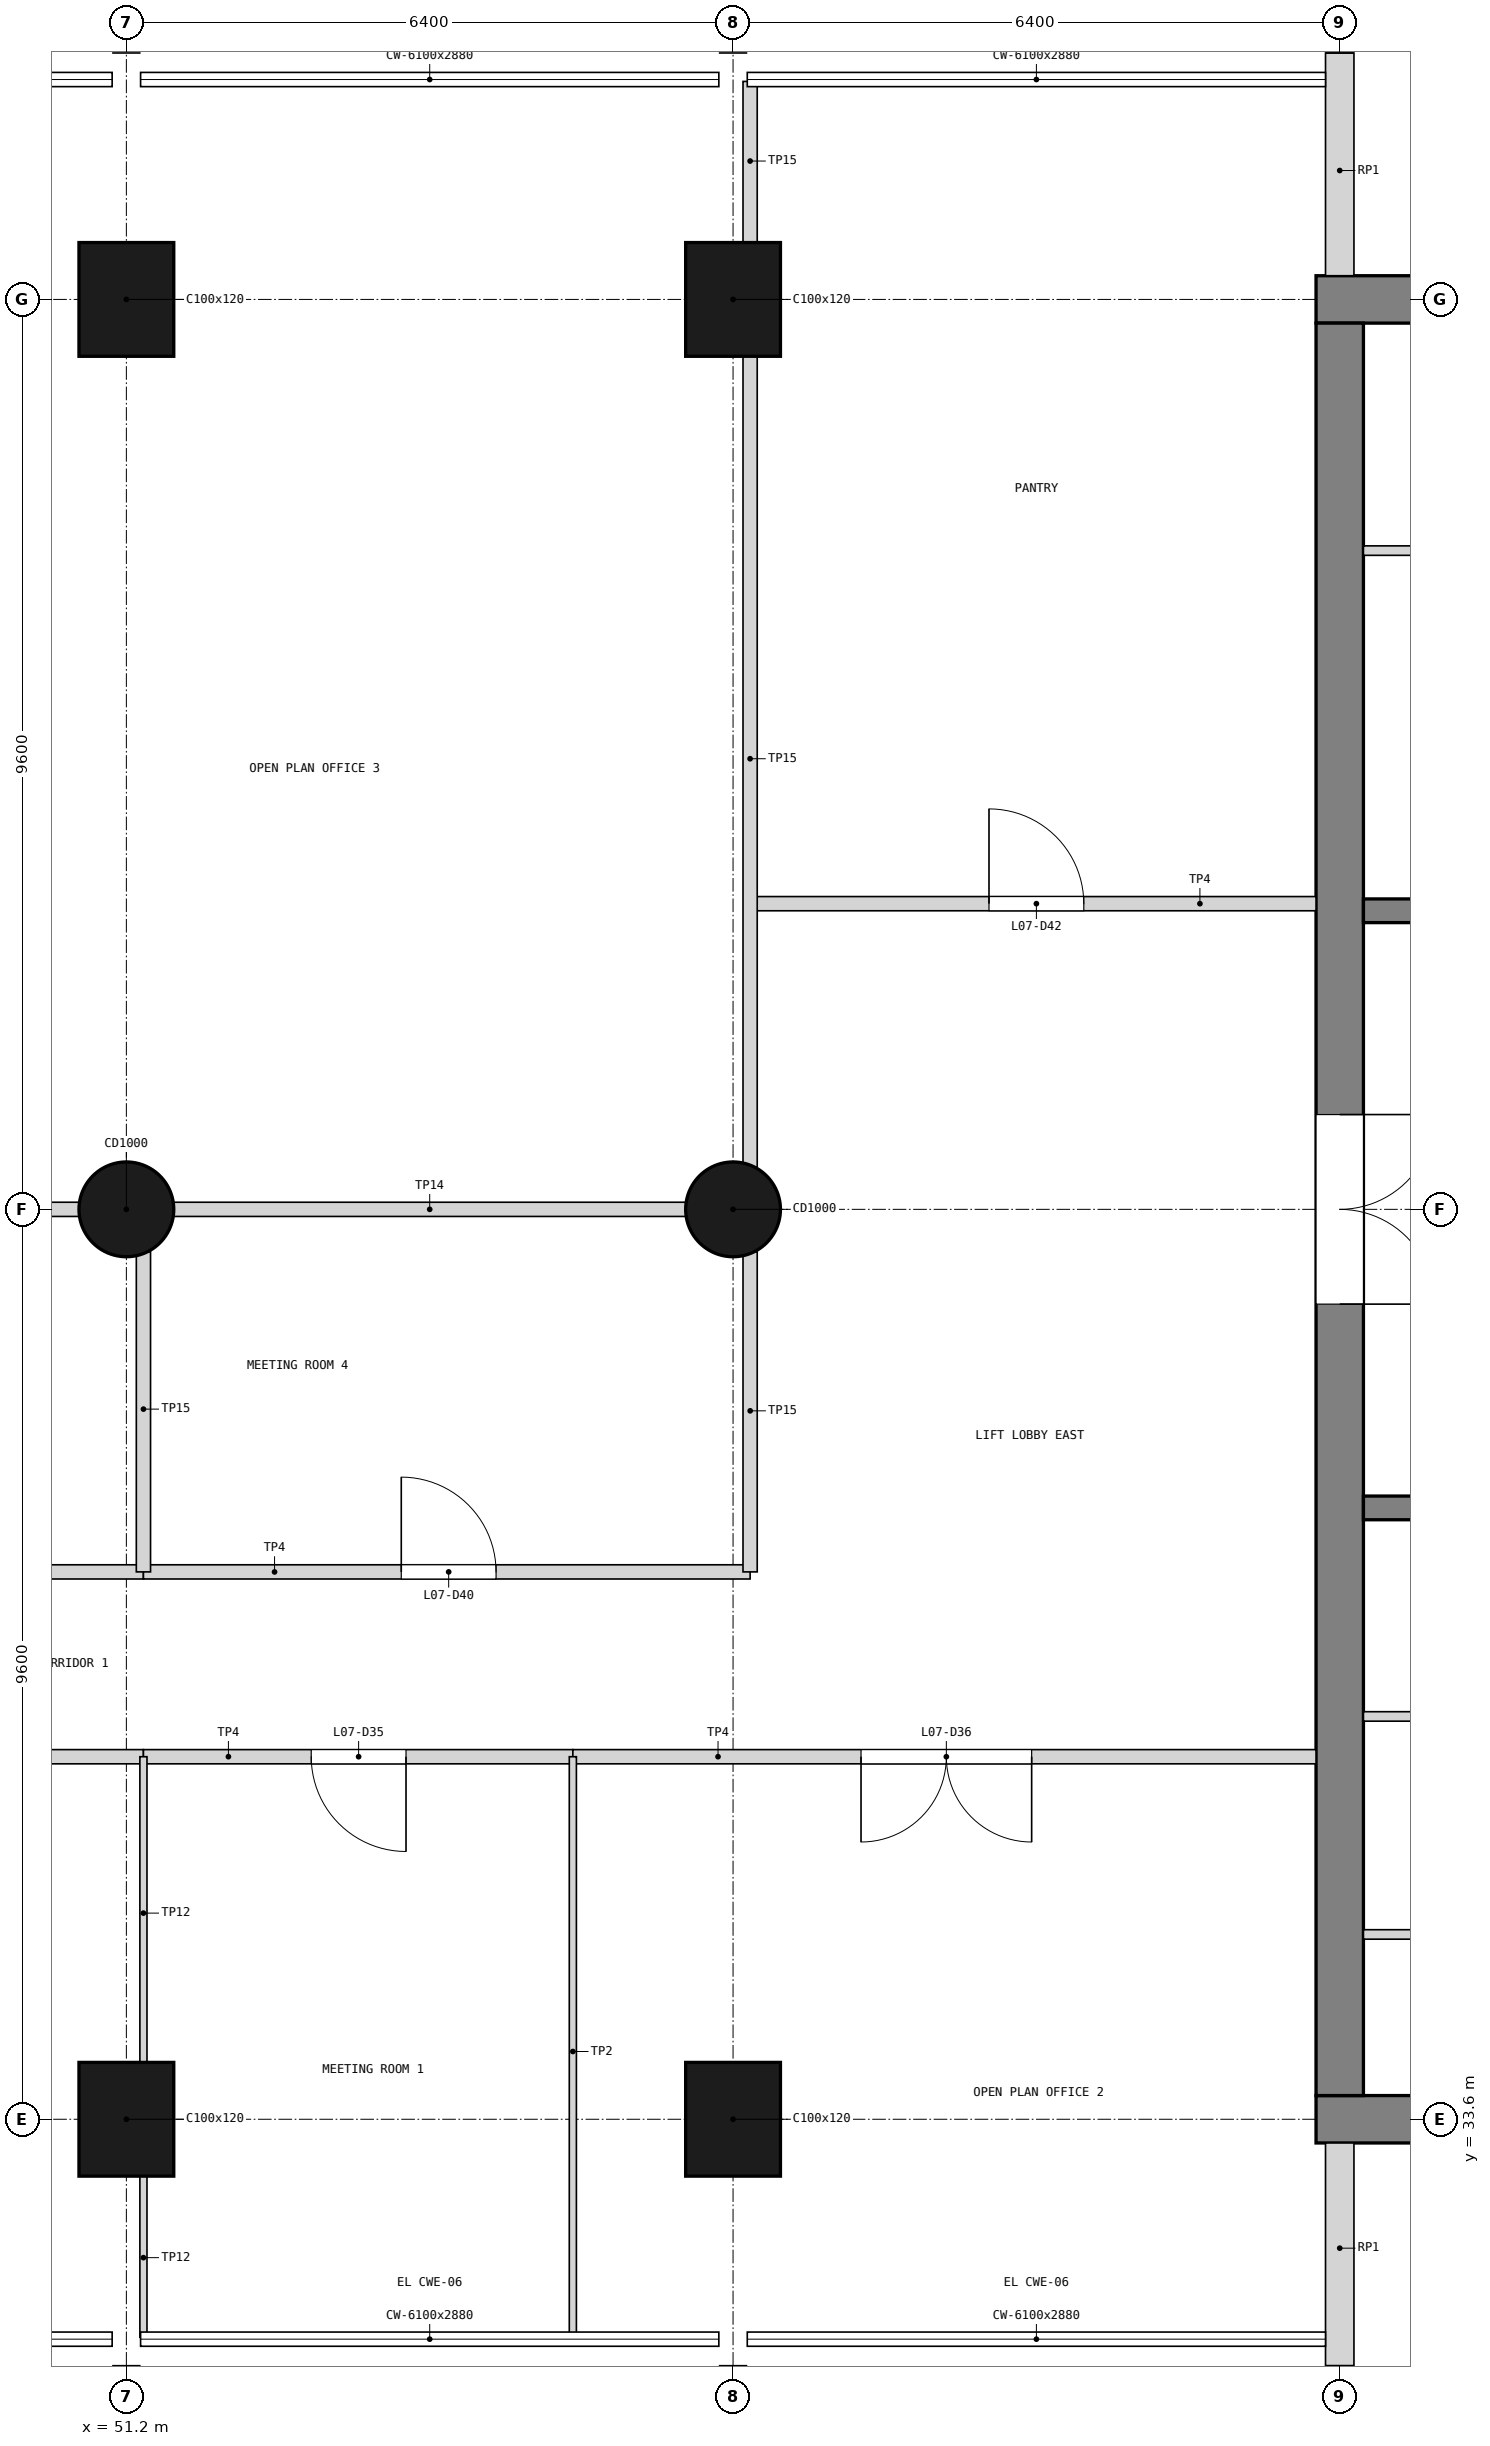
"""IFC4 building model, lengths in metres.
Left out: names, types, materials, properties, quantities, classifications, styles, units other than length and angle.
Written with IfcOpenShell. Run it as: python <this file> out.ifc"""

import sys

from ifc_helpers import new_model, si_unit, direction, frame, frame_2d, origin, origin_2d, place, context, subcontext, project, spatial, rectangle, circle, extrude, element, fill, save


model = new_model("IFC4")
c1 = context("Model", 3, precision=1e-05, world=origin(), true_north=direction((0.0, 1.0)))
c2 = subcontext(c1, "Body", "Model", "MODEL_VIEW")
j1 = project(units=[si_unit("LENGTHUNIT", "METRE"), si_unit("PLANEANGLEUNIT", "RADIAN")], contexts=[c1])
p1 = place(None, origin())
s1 = spatial("IfcSite", under=j1, at=p1, CompositionType="ELEMENT")
p2 = place(p1, origin())
s2 = spatial("IfcBuilding", under=s1, at=p2, CompositionType="ELEMENT")
p3 = place(p2, frame((0.0, 0.0, 28.8)))
s3 = spatial("IfcBuildingStorey", under=s2, at=p3, CompositionType="ELEMENT", Elevation=28.8)
p4 = place(p3, frame((63.75, 52.8, 0.0), z_axis=(0.0, 0.0, 1.0), x_axis=(1.0, 0.0, 0.0)))
e1 = element("IfcWall", 1, at=p4, inside=s3, PredefinedType="SHEAR", context=c2, shape_type="SweptSolid", body=[
    extrude(rectangle(XDim=13.3, YDim=0.5, at=frame_2d((6.65, 0.0))), origin(), (0.0, 0.0, 1.0), 3.9),
])
p5 = place(p4, frame((11.05, 0.0, 1.0)))
e2 = element("IfcOpeningElement", 2, at=p5, cuts=e1, PredefinedType="OPENING", context=c2, shape_type="SweptSolid", body=[
    extrude(rectangle(XDim=0.4, YDim=2.0, at=frame_2d((0.2, 1.0))), frame((0.0, 0.26, 0.0), z_axis=(0.0, -1.0, 0.0), x_axis=(1.0, 0.0, 0.0)), (0.0, 0.0, 1.0), 0.52),
])
p6 = place(p3, frame((63.75, 33.6, 0.0), z_axis=(0.0, 0.0, 1.0), x_axis=(1.0, 0.0, 0.0)))
e3 = element("IfcWall", 3, at=p6, inside=s3, PredefinedType="SHEAR", context=c2, shape_type="SweptSolid", body=[
    extrude(rectangle(XDim=13.3, YDim=0.5, at=frame_2d((6.65, 0.0))), origin(), (0.0, 0.0, 1.0), 3.9),
])
p7 = place(p6, frame((11.05, 0.0, 1.0)))
e4 = element("IfcOpeningElement", 4, at=p7, cuts=e3, PredefinedType="OPENING", context=c2, shape_type="SweptSolid", body=[
    extrude(rectangle(XDim=0.4, YDim=2.0, at=frame_2d((0.2, 1.0))), frame((0.0, 0.26, 0.0), z_axis=(0.0, -1.0, 0.0), x_axis=(1.0, 0.0, 0.0)), (0.0, 0.0, 1.0), 0.52),
])
p8 = place(p3, frame((64.0, 33.85, 0.0), z_axis=(0.0, 0.0, 1.0), x_axis=(0.0, 1.0, 0.0)))
e5 = element("IfcWall", 5, at=p8, inside=s3, PredefinedType="SHEAR", context=c2, shape_type="SweptSolid", body=[
    extrude(rectangle(XDim=18.7, YDim=0.5, at=frame_2d((9.35, 0.0))), origin(), (0.0, 0.0, 1.0), 3.9),
])
p9 = place(p8, frame((8.35, 0.0, 0.0)))
e6 = element("IfcOpeningElement", 6, at=p9, cuts=e5, PredefinedType="OPENING", context=c2, shape_type="SweptSolid", body=[
    extrude(rectangle(XDim=2.0, YDim=2.1, at=frame_2d((1.0, 1.05))), frame((0.0, 0.26, 0.0), z_axis=(0.0, -1.0, 0.0), x_axis=(1.0, 0.0, 0.0)), (0.0, 0.0, 1.0), 0.52),
])
p10 = place(p3, frame((51.2, 33.6, 0.0), z_axis=(0.0, 0.0, 1.0), x_axis=(1.0, 0.0, 0.0)))
e7 = element("IfcColumn", 7, at=p10, inside=s3, PredefinedType="COLUMN", context=c2, shape_type="SweptSolid", body=[
    extrude(rectangle(XDim=1.0, YDim=1.2, at=origin_2d()), origin(), (0.0, 0.0, 1.0), 3.9),
])
p11 = place(p3, frame((51.2, 43.2, 0.0), z_axis=(0.0, 0.0, 1.0), x_axis=(1.0, 0.0, 0.0)))
e8 = element("IfcColumn", 8, at=p11, inside=s3, PredefinedType="COLUMN", context=c2, shape_type="SweptSolid", body=[
    extrude(circle(Radius=0.5, at=origin_2d()), origin(), (0.0, 0.0, 1.0), 3.9),
])
for number, where, z_axis, x_axis in (
    (9, (51.2, 52.8, 0.0), (0.0, 0.0, 1.0), (1.0, 0.0, 0.0)),
    (10, (57.6, 33.6, 0.0), (0.0, 0.0, 1.0), (1.0, 0.0, 0.0)),
):
    element("IfcColumn", number, at=place(p3, frame(where, z_axis=z_axis, x_axis=x_axis)), inside=s3, PredefinedType="COLUMN", context=c2, shape_type="SweptSolid", body=[
        extrude(rectangle(XDim=1.0, YDim=1.2, at=origin_2d()), origin(), (0.0, 0.0, 1.0), 3.9),
    ])
p12 = place(p3, frame((57.6, 43.2, 0.0), z_axis=(0.0, 0.0, 1.0), x_axis=(1.0, 0.0, 0.0)))
e11 = element("IfcColumn", 11, at=p12, inside=s3, PredefinedType="COLUMN", context=c2, shape_type="SweptSolid", body=[
    extrude(circle(Radius=0.5, at=origin_2d()), origin(), (0.0, 0.0, 1.0), 3.9),
])
p13 = place(p3, frame((57.6, 52.8, 0.0), z_axis=(0.0, 0.0, 1.0), x_axis=(1.0, 0.0, 0.0)))
e12 = element("IfcColumn", 12, at=p13, inside=s3, PredefinedType="COLUMN", context=c2, shape_type="SweptSolid", body=[
    extrude(rectangle(XDim=1.0, YDim=1.2, at=origin_2d()), origin(), (0.0, 0.0, 1.0), 3.9),
])
p14 = place(p3, frame((64.0, 31.0, 0.0), z_axis=(0.0, 0.0, 1.0), x_axis=(0.0, 1.0, 0.0)))
e13 = element("IfcWall", 13, at=p14, inside=s3, PredefinedType="SOLIDWALL", context=c2, shape_type="SweptSolid", body=[
    extrude(rectangle(XDim=2.35, YDim=0.3, at=frame_2d((1.175, 0.0))), origin(), (0.0, 0.0, 1.0), 2.88),
])
p15 = place(p3, frame((64.0, 53.05, 0.0), z_axis=(0.0, 0.0, 1.0), x_axis=(0.0, 1.0, 0.0)))
e14 = element("IfcWall", 14, at=p15, inside=s3, PredefinedType="SOLIDWALL", context=c2, shape_type="SweptSolid", body=[
    extrude(rectangle(XDim=2.35, YDim=0.3, at=frame_2d((1.175, 0.0))), origin(), (0.0, 0.0, 1.0), 2.88),
])
for number, where, z_axis, x_axis in (
    (15, (69.725, 40.05, 0.0), (0.0, 0.0, 1.0), (-1.0, 0.0, 0.0)),
    (16, (69.725, 46.35, 0.0), (0.0, 0.0, 1.0), (-1.0, 0.0, 0.0)),
):
    element("IfcWall", number, at=place(p3, frame(where, z_axis=z_axis, x_axis=x_axis)), inside=s3, PredefinedType="SOLIDWALL", context=c2, shape_type="SweptSolid", body=[
        extrude(rectangle(XDim=5.475, YDim=0.25, at=frame_2d((2.738, 0.0))), origin(), (0.0, 0.0, 1.0), 3.6),
    ])
p16 = place(p3, frame((69.475, 35.55, 0.0), z_axis=(0.0, 0.0, 1.0), x_axis=(-1.0, 0.0, 0.0)))
e17 = element("IfcWall", 17, at=p16, inside=s3, PredefinedType="PARTITIONING", context=c2, shape_type="SweptSolid", body=[
    extrude(rectangle(XDim=5.225, YDim=0.1, at=frame_2d((2.613, 0.0))), origin(), (0.0, 0.0, 1.0), 3.6),
])
p17 = place(p3, frame((67.925, 37.85, 0.0), z_axis=(0.0, 0.0, 1.0), x_axis=(-1.0, 0.0, 0.0)))
e18 = element("IfcWall", 18, at=p17, inside=s3, PredefinedType="PARTITIONING", context=c2, shape_type="SweptSolid", body=[
    extrude(rectangle(XDim=3.675, YDim=0.1, at=frame_2d((1.837, 0.0))), origin(), (0.0, 0.0, 1.0), 3.6),
])
p18 = place(p3, frame((69.475, 50.15, 0.0), z_axis=(0.0, 0.0, 1.0), x_axis=(-1.0, 0.0, 0.0)))
e19 = element("IfcWall", 19, at=p18, inside=s3, PredefinedType="PARTITIONING", context=c2, shape_type="SweptSolid", body=[
    extrude(rectangle(XDim=5.225, YDim=0.1, at=frame_2d((2.613, 0.0))), origin(), (0.0, 0.0, 1.0), 3.6),
])
p19 = place(p3, frame((38.22, 37.425, 0.0), z_axis=(0.0, 0.0, 1.0), x_axis=(1.0, 0.0, 0.0)))
e20 = element("IfcWall", 20, at=p19, inside=s3, PredefinedType="PARTITIONING", context=c2, shape_type="SweptSolid", body=[
    extrude(rectangle(XDim=13.16, YDim=0.15, at=frame_2d((6.58, 0.0))), origin(), (0.0, 0.0, 1.0), 3.68),
])
p20 = place(p19, frame((2.43, 0.0, 0.0)))
e21 = element("IfcOpeningElement", 21, at=p20, cuts=e20, PredefinedType="OPENING", context=c2, shape_type="SweptSolid", body=[
    extrude(rectangle(XDim=1.8, YDim=2.1, at=frame_2d((0.9, 1.05))), frame((0.0, 0.085, 0.0), z_axis=(0.0, -1.0, 0.0), x_axis=(1.0, 0.0, 0.0)), (0.0, 0.0, 1.0), 0.17),
])
p21 = place(p19, frame((8.93, 0.0, 0.0)))
e22 = element("IfcOpeningElement", 22, at=p21, cuts=e20, PredefinedType="OPENING", context=c2, shape_type="SweptSolid", body=[
    extrude(rectangle(XDim=1.8, YDim=2.1, at=frame_2d((0.9, 1.05))), frame((0.0, 0.085, 0.0), z_axis=(0.0, -1.0, 0.0), x_axis=(1.0, 0.0, 0.0)), (0.0, 0.0, 1.0), 0.17),
])
p22 = place(p3, frame((51.38, 37.425, 0.0), z_axis=(0.0, 0.0, 1.0), x_axis=(1.0, 0.0, 0.0)))
e23 = element("IfcWall", 23, at=p22, inside=s3, PredefinedType="PARTITIONING", context=c2, shape_type="SweptSolid", body=[
    extrude(rectangle(XDim=4.53, YDim=0.15, at=frame_2d((2.265, 0.0))), origin(), (0.0, 0.0, 1.0), 3.68),
])
p23 = place(p22, frame((1.77, 0.0, 0.0)))
e24 = element("IfcOpeningElement", 24, at=p23, cuts=e23, PredefinedType="OPENING", context=c2, shape_type="SweptSolid", body=[
    extrude(rectangle(XDim=1.0, YDim=2.1, at=frame_2d((0.5, 1.05))), frame((0.0, 0.085, 0.0), z_axis=(0.0, -1.0, 0.0), x_axis=(1.0, 0.0, 0.0)), (0.0, 0.0, 1.0), 0.17),
])
p24 = place(p3, frame((55.91, 37.425, 0.0), z_axis=(0.0, 0.0, 1.0), x_axis=(1.0, 0.0, 0.0)))
e25 = element("IfcWall", 25, at=p24, inside=s3, PredefinedType="PARTITIONING", context=c2, shape_type="SweptSolid", body=[
    extrude(rectangle(XDim=7.84, YDim=0.15, at=frame_2d((3.92, 0.0))), origin(), (0.0, 0.0, 1.0), 3.68),
])
p25 = place(p24, frame((3.04, 0.0, 0.0)))
e26 = element("IfcOpeningElement", 26, at=p25, cuts=e25, PredefinedType="OPENING", context=c2, shape_type="SweptSolid", body=[
    extrude(rectangle(XDim=1.8, YDim=2.1, at=frame_2d((0.9, 1.05))), frame((0.0, 0.085, 0.0), z_axis=(0.0, -1.0, 0.0), x_axis=(1.0, 0.0, 0.0)), (0.0, 0.0, 1.0), 0.17),
])
p26 = place(p3, frame((51.38, 31.3, 0.0), z_axis=(0.0, 0.0, 1.0), x_axis=(0.0, 1.0, 0.0)))
e27 = element("IfcWall", 27, at=p26, inside=s3, PredefinedType="PARTITIONING", context=c2, shape_type="SweptSolid", body=[
    extrude(rectangle(XDim=1.72, YDim=0.075, at=frame_2d((0.86, 0.0))), origin(), (0.0, 0.0, 1.0), 2.78),
])
p27 = place(p3, frame((51.38, 34.18, 0.0), z_axis=(0.0, 0.0, 1.0), x_axis=(0.0, 1.0, 0.0)))
e28 = element("IfcWall", 28, at=p27, inside=s3, PredefinedType="PARTITIONING", context=c2, shape_type="SweptSolid", body=[
    extrude(rectangle(XDim=3.245, YDim=0.075, at=frame_2d((1.623, 0.0))), origin(), (0.0, 0.0, 1.0), 2.78),
])
p28 = place(p3, frame((55.91, 31.3, 0.0), z_axis=(0.0, 0.0, 1.0), x_axis=(0.0, 1.0, 0.0)))
e29 = element("IfcWall", 29, at=p28, inside=s3, PredefinedType="PARTITIONING", context=c2, shape_type="SweptSolid", body=[
    extrude(rectangle(XDim=6.125, YDim=0.075, at=frame_2d((3.062, 0.0))), origin(), (0.0, 0.0, 1.0), 3.68),
])
p29 = place(p3, frame((44.62, 39.375, 0.0), z_axis=(0.0, 0.0, 1.0), x_axis=(1.0, 0.0, 0.0)))
e30 = element("IfcWall", 30, at=p29, inside=s3, PredefinedType="PARTITIONING", context=c2, shape_type="SweptSolid", body=[
    extrude(rectangle(XDim=6.76, YDim=0.15, at=frame_2d((3.38, 0.0))), origin(), (0.0, 0.0, 1.0), 3.68),
])
p30 = place(p29, frame((2.48, 0.0, 0.0)))
e31 = element("IfcOpeningElement", 31, at=p30, cuts=e30, PredefinedType="OPENING", context=c2, shape_type="SweptSolid", body=[
    extrude(rectangle(XDim=1.8, YDim=2.1, at=frame_2d((0.9, 1.05))), frame((0.0, 0.085, 0.0), z_axis=(0.0, -1.0, 0.0), x_axis=(1.0, 0.0, 0.0)), (0.0, 0.0, 1.0), 0.17),
])
p31 = place(p3, frame((51.38, 39.375, 0.0), z_axis=(0.0, 0.0, 1.0), x_axis=(1.0, 0.0, 0.0)))
e32 = element("IfcWall", 32, at=p31, inside=s3, PredefinedType="PARTITIONING", context=c2, shape_type="SweptSolid", body=[
    extrude(rectangle(XDim=6.4, YDim=0.15, at=frame_2d((3.2, 0.0))), origin(), (0.0, 0.0, 1.0), 3.68),
])
p32 = place(p31, frame((2.72, 0.0, 0.0)))
e33 = element("IfcOpeningElement", 33, at=p32, cuts=e32, PredefinedType="OPENING", context=c2, shape_type="SweptSolid", body=[
    extrude(rectangle(XDim=1.0, YDim=2.1, at=frame_2d((0.5, 1.05))), frame((0.0, 0.085, 0.0), z_axis=(0.0, -1.0, 0.0), x_axis=(1.0, 0.0, 0.0)), (0.0, 0.0, 1.0), 0.17),
])
p33 = place(p3, frame((51.38, 39.375, 0.0), z_axis=(0.0, 0.0, 1.0), x_axis=(0.0, 1.0, 0.0)))
e34 = element("IfcWall", 34, at=p33, inside=s3, PredefinedType="PARTITIONING", context=c2, shape_type="SweptSolid", body=[
    extrude(rectangle(XDim=3.378, YDim=0.15, at=frame_2d((1.689, 0.0))), origin(), (0.0, 0.0, 1.0), 2.78),
])
p34 = place(p3, frame((31.82, 43.2, 0.0), z_axis=(0.0, 0.0, 1.0), x_axis=(1.0, 0.0, 0.0)))
e35 = element("IfcWall", 35, at=p34, inside=s3, PredefinedType="PARTITIONING", context=c2, shape_type="SweptSolid", body=[
    extrude(rectangle(XDim=25.96, YDim=0.15, at=frame_2d((12.98, 0.0))), origin(), (0.0, 0.0, 1.0), 2.88),
])
p35 = place(p34, frame((13.825, 0.0, 0.0)))
e36 = element("IfcOpeningElement", 36, at=p35, cuts=e35, PredefinedType="OPENING", context=c2, shape_type="SweptSolid", body=[
    extrude(rectangle(XDim=1.8, YDim=2.1, at=frame_2d((0.9, 1.05))), frame((0.0, 0.085, 0.0), z_axis=(0.0, -1.0, 0.0), x_axis=(1.0, 0.0, 0.0)), (0.0, 0.0, 1.0), 0.17),
])
p36 = place(p34, frame((16.775, 0.0, 0.0)))
e37 = element("IfcOpeningElement", 37, at=p36, cuts=e35, PredefinedType="OPENING", context=c2, shape_type="SweptSolid", body=[
    extrude(rectangle(XDim=1.8, YDim=2.1, at=frame_2d((0.9, 1.05))), frame((0.0, 0.085, 0.0), z_axis=(0.0, -1.0, 0.0), x_axis=(1.0, 0.0, 0.0)), (0.0, 0.0, 1.0), 0.17),
])
p37 = place(p3, frame((57.78, 46.425, 0.0), z_axis=(0.0, 0.0, 1.0), x_axis=(1.0, 0.0, 0.0)))
e38 = element("IfcWall", 38, at=p37, inside=s3, PredefinedType="PARTITIONING", context=c2, shape_type="SweptSolid", body=[
    extrude(rectangle(XDim=5.97, YDim=0.15, at=frame_2d((2.985, 0.0))), origin(), (0.0, 0.0, 1.0), 3.68),
])
p38 = place(p37, frame((2.52, 0.0, 0.0)))
e39 = element("IfcOpeningElement", 39, at=p38, cuts=e38, PredefinedType="OPENING", context=c2, shape_type="SweptSolid", body=[
    extrude(rectangle(XDim=1.0, YDim=2.1, at=frame_2d((0.5, 1.05))), frame((0.0, 0.085, 0.0), z_axis=(0.0, -1.0, 0.0), x_axis=(1.0, 0.0, 0.0)), (0.0, 0.0, 1.0), 0.17),
])
p39 = place(p3, frame((57.78, 39.375, 0.0), z_axis=(0.0, 0.0, 1.0), x_axis=(0.0, 1.0, 0.0)))
e40 = element("IfcWall", 40, at=p39, inside=s3, PredefinedType="PARTITIONING", context=c2, shape_type="SweptSolid", body=[
    extrude(rectangle(XDim=3.378, YDim=0.15, at=frame_2d((1.689, 0.0))), origin(), (0.0, 0.0, 1.0), 2.78),
])
p40 = place(p3, frame((57.78, 43.646, 0.0), z_axis=(0.0, 0.0, 1.0), x_axis=(0.0, 1.0, 0.0)))
e41 = element("IfcWall", 41, at=p40, inside=s3, PredefinedType="PARTITIONING", context=c2, shape_type="SweptSolid", body=[
    extrude(rectangle(XDim=8.573, YDim=0.15, at=frame_2d((4.287, 0.0))), origin(), (0.0, 0.0, 1.0), 2.78),
])
p41 = place(p3, frame((57.78, 53.38, 0.0), z_axis=(0.0, 0.0, 1.0), x_axis=(0.0, 1.0, 0.0)))
e42 = element("IfcWall", 42, at=p41, inside=s3, PredefinedType="PARTITIONING", context=c2, shape_type="SweptSolid", body=[
    extrude(rectangle(XDim=1.72, YDim=0.15, at=frame_2d((0.86, 0.0))), origin(), (0.0, 0.0, 1.0), 2.78),
])
p42 = place(p9, frame((2.0, 0.0, 0.0), z_axis=(0.0, 0.0, 1.0), x_axis=(-1.0, 0.0, 0.0)))
e43 = element("IfcDoor", 43, at=p42, inside=s3, OperationType="DOUBLE_DOOR_SINGLE_SWING", PredefinedType="DOOR", context=c2, shape_type="SweptSolid", body=[
    extrude(rectangle(XDim=2.0, YDim=2.1, at=frame_2d((1.0, 1.05))), frame((0.0, 0.025, 0.0), z_axis=(0.0, -1.0, 0.0), x_axis=(1.0, 0.0, 0.0)), (0.0, 0.0, 1.0), 0.05),
])
fill(e6, e43)
p43 = place(p23, frame((1.0, 0.0, 0.0), z_axis=(0.0, 0.0, 1.0), x_axis=(-1.0, 0.0, 0.0)))
e44 = element("IfcDoor", 44, at=p43, inside=s3, OperationType="SINGLE_SWING_LEFT", PredefinedType="DOOR", context=c2, shape_type="SweptSolid", body=[
    extrude(rectangle(XDim=1.0, YDim=2.1, at=frame_2d((0.5, 1.05))), frame((0.0, 0.025, 0.0), z_axis=(0.0, -1.0, 0.0), x_axis=(1.0, 0.0, 0.0)), (0.0, 0.0, 1.0), 0.05),
])
fill(e24, e44)
p44 = place(p25, frame((1.8, 0.0, 0.0), z_axis=(0.0, 0.0, 1.0), x_axis=(-1.0, 0.0, 0.0)))
e45 = element("IfcDoor", 45, at=p44, inside=s3, OperationType="DOUBLE_DOOR_SINGLE_SWING", PredefinedType="DOOR", context=c2, shape_type="SweptSolid", body=[
    extrude(rectangle(XDim=1.8, YDim=2.1, at=frame_2d((0.9, 1.05))), frame((0.0, 0.025, 0.0), z_axis=(0.0, -1.0, 0.0), x_axis=(1.0, 0.0, 0.0)), (0.0, 0.0, 1.0), 0.05),
])
fill(e26, e45)
p45 = place(p32, origin())
e46 = element("IfcDoor", 46, at=p45, inside=s3, OperationType="SINGLE_SWING_LEFT", PredefinedType="DOOR", context=c2, shape_type="SweptSolid", body=[
    extrude(rectangle(XDim=1.0, YDim=2.1, at=frame_2d((0.5, 1.05))), frame((0.0, 0.025, 0.0), z_axis=(0.0, -1.0, 0.0), x_axis=(1.0, 0.0, 0.0)), (0.0, 0.0, 1.0), 0.05),
])
fill(e33, e46)
p46 = place(p38, origin())
e47 = element("IfcDoor", 47, at=p46, inside=s3, OperationType="SINGLE_SWING_LEFT", PredefinedType="DOOR", context=c2, shape_type="SweptSolid", body=[
    extrude(rectangle(XDim=1.0, YDim=2.1, at=frame_2d((0.5, 1.05))), frame((0.0, 0.025, 0.0), z_axis=(0.0, -1.0, 0.0), x_axis=(1.0, 0.0, 0.0)), (0.0, 0.0, 1.0), 0.05),
])
fill(e39, e47)
save(model, sys.argv[1])
